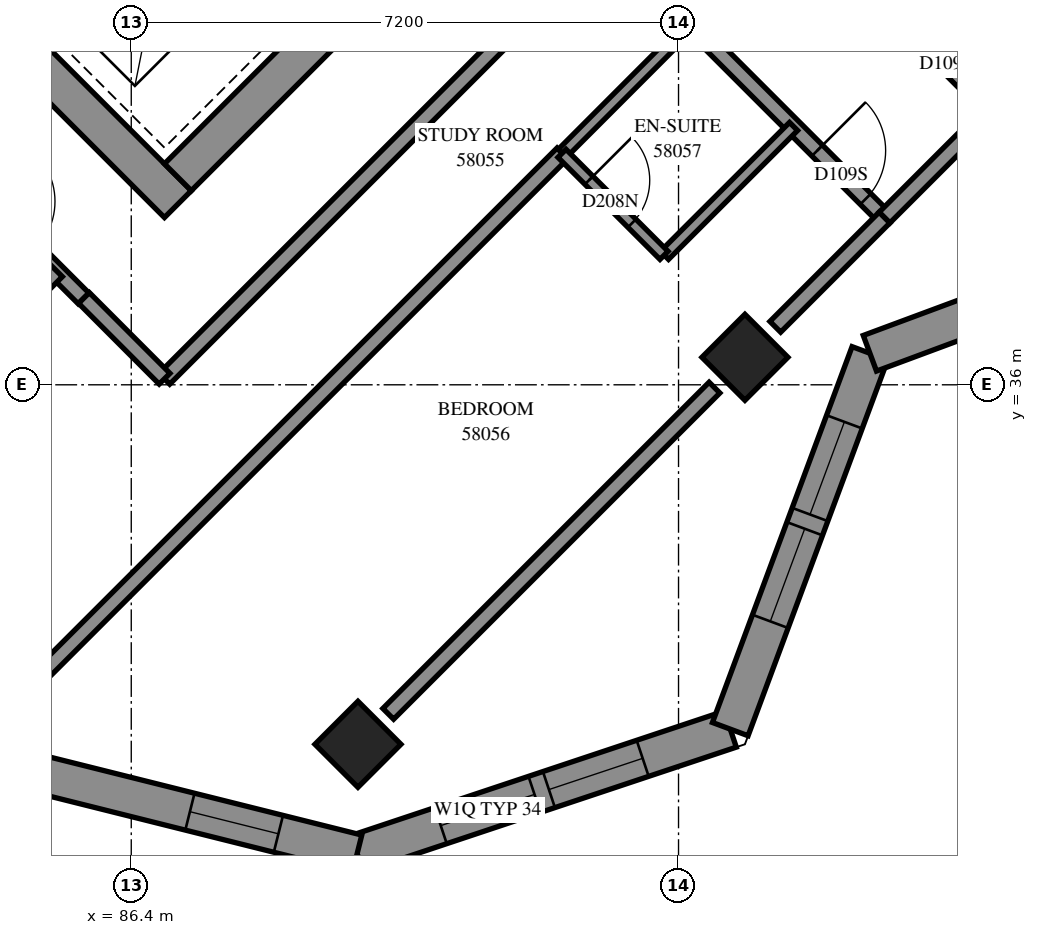
"""IFC4 building model, lengths in metres.
Left out: names, types, materials, properties, quantities, classifications, styles, units other than length and angle.
Written with IfcOpenShell. Run it as: python <this file> out.ifc"""

import sys

from ifc_helpers import new_model, si_unit, direction, frame, frame_2d, origin, origin_2d, place, context, subcontext, project, spatial, polyline, rectangle, outline, extrude, element, fill, save


model = new_model("IFC4")
c1 = context("Model", 3, precision=1e-05, world=origin(), true_north=direction((0.0, 1.0)))
c2 = subcontext(c1, "Body", "Model", "MODEL_VIEW")
j1 = project(units=[si_unit("LENGTHUNIT", "METRE"), si_unit("PLANEANGLEUNIT", "RADIAN")], contexts=[c1])
p1 = place(None, origin())
s1 = spatial("IfcSite", under=j1, at=p1, CompositionType="ELEMENT")
p2 = place(p1, origin())
s2 = spatial("IfcBuilding", under=s1, at=p2, CompositionType="ELEMENT")
p3 = place(p2, frame((0.0, 0.0, 213.4)))
s3 = spatial("IfcBuildingStorey", under=s2, at=p3, CompositionType="ELEMENT", Elevation=213.4)
for number, where, z_axis, x_axis in (
    (1, (94.474, 36.362, 0.0), (0.0, 0.0, 1.0), (0.707, -0.707, 0.0)),
    (2, (89.382, 31.271, 0.0), (0.0, 0.0, 1.0), (0.707, -0.707, 0.0)),
):
    element("IfcColumn", number, at=place(p3, frame(where, z_axis=z_axis, x_axis=x_axis)), inside=s3, PredefinedType="COLUMN", context=c2, shape_type="SweptSolid", body=[
        extrude(rectangle(XDim=0.8, YDim=0.8, at=origin_2d()), origin(), (0.0, 0.0, 1.0), 3.1),
    ])
p4 = place(p3, frame((76.124, 49.267, -0.3), z_axis=(0.0, 0.0, 1.0), x_axis=(0.7071067812, -0.7071067812, 0.0)))
e3 = element("IfcWall", 3, at=p4, inside=s3, PredefinedType="SHEAR", context=c2, shape_type="SweptSolid", body=[
    extrude(rectangle(XDim=15.4, YDim=0.5, at=frame_2d((7.7, 0.0))), origin(), (0.0, 0.0, 1.0), 2.7),
])
p5 = place(p3, frame((87.013, 38.731, -0.3), z_axis=(0.0, 0.0, 1.0), x_axis=(0.7071067812, 0.7071067812, 0.0)))
e4 = element("IfcWall", 4, at=p5, inside=s3, PredefinedType="SHEAR", context=c2, shape_type="SweptSolid", body=[
    extrude(rectangle(XDim=14.4, YDim=0.5, at=frame_2d((7.2, 0.0))), origin(), (0.0, 0.0, 1.0), 2.7),
])
p6 = place(p5, frame((4.55, 0.0, 0.3)))
e5 = element("IfcOpeningElement", 5, at=p6, cuts=e4, PredefinedType="OPENING", context=c2, shape_type="SweptSolid", body=[
    extrude(rectangle(XDim=1.1, YDim=2.1, at=frame_2d((0.55, 1.05))), frame((0.0, 0.26, 0.0), z_axis=(0.0, -1.0, 0.0), x_axis=(1.0, 0.0, 0.0)), (0.0, 0.0, 1.0), 0.52),
])
p7 = place(p5, frame((11.35, 0.0, 0.3)))
e6 = element("IfcOpeningElement", 6, at=p7, cuts=e4, PredefinedType="OPENING", context=c2, shape_type="SweptSolid", body=[
    extrude(rectangle(XDim=1.1, YDim=2.1, at=frame_2d((0.55, 1.05))), frame((0.0, 0.26, 0.0), z_axis=(0.0, -1.0, 0.0), x_axis=(1.0, 0.0, 0.0)), (0.0, 0.0, 1.0), 0.52),
])
p8 = place(p3, frame((89.372, 29.834, 0.0), z_axis=(0.0, 0.0, 1.0), x_axis=(0.9486871635, 0.3162161695, 0.0)))
e7 = element("IfcWall", 7, at=p8, inside=s3, PredefinedType="SOLIDWALL", context=c2, shape_type="SweptSolid", body=[
    extrude(outline(polyline([(-0.073, -0.25), (5.294, -0.25), (5.054, 0.25), (0.073, 0.25), (-0.073, -0.25)])), origin(), (0.0, 0.0, 1.0), 3.1),
])
p9 = place(p8, frame((1.159, 0.0, 0.45)))
e8 = element("IfcOpeningElement", 8, at=p9, cuts=e7, PredefinedType="OPENING", context=c2, shape_type="SweptSolid", body=[
    extrude(rectangle(XDim=1.3, YDim=2.5, at=frame_2d((0.65, 1.25))), frame((0.0, 0.26, 0.0), z_axis=(0.0, -1.0, 0.0), x_axis=(1.0, 0.0, 0.0)), (0.0, 0.0, 1.0), 0.52),
])
p10 = place(p8, frame((2.659, 0.0, 0.45)))
e9 = element("IfcOpeningElement", 9, at=p10, cuts=e7, PredefinedType="OPENING", context=c2, shape_type="SweptSolid", body=[
    extrude(rectangle(XDim=1.3, YDim=2.5, at=frame_2d((0.65, 1.25))), frame((0.0, 0.26, 0.0), z_axis=(0.0, -1.0, 0.0), x_axis=(1.0, 0.0, 0.0)), (0.0, 0.0, 1.0), 0.52),
])
p11 = place(p3, frame((94.281, 31.47, 0.0), z_axis=(0.0, 0.0, 1.0), x_axis=(0.3481903374, 0.9374238577, 0.0)))
e10 = element("IfcWall", 10, at=p11, inside=s3, PredefinedType="SOLIDWALL", context=c2, shape_type="SweptSolid", body=[
    extrude(outline(polyline([(-0.12, -0.25), (5.16, -0.25), (5.39, 0.25), (0.12, 0.25), (-0.12, -0.25)])), origin(), (0.0, 0.0, 1.0), 3.1),
])
p12 = place(p11, frame((1.512, 0.0, 0.45)))
e11 = element("IfcOpeningElement", 11, at=p12, cuts=e10, PredefinedType="OPENING", context=c2, shape_type="SweptSolid", body=[
    extrude(rectangle(XDim=1.3, YDim=2.5, at=frame_2d((0.65, 1.25))), frame((0.0, 0.26, 0.0), z_axis=(0.0, -1.0, 0.0), x_axis=(1.0, 0.0, 0.0)), (0.0, 0.0, 1.0), 0.52),
])
p13 = place(p11, frame((3.012, 0.0, 0.45)))
e12 = element("IfcOpeningElement", 12, at=p13, cuts=e10, PredefinedType="OPENING", context=c2, shape_type="SweptSolid", body=[
    extrude(rectangle(XDim=1.3, YDim=2.5, at=frame_2d((0.65, 1.25))), frame((0.0, 0.26, 0.0), z_axis=(0.0, -1.0, 0.0), x_axis=(1.0, 0.0, 0.0)), (0.0, 0.0, 1.0), 0.52),
])
p14 = place(p3, frame((96.118, 36.415, 0.0), z_axis=(0.0, 0.0, 1.0), x_axis=(0.9374238577, 0.3481903374, 0.0)))
e13 = element("IfcWall", 13, at=p14, inside=s3, PredefinedType="SOLIDWALL", context=c2, shape_type="SweptSolid", body=[
    extrude(outline(polyline([(0.115, -0.25), (5.395, -0.25), (5.155, 0.25), (-0.115, 0.25), (0.115, -0.25)])), origin(), (0.0, 0.0, 1.0), 3.1),
])
p15 = place(p14, frame((1.655, 0.0, 0.45)))
e14 = element("IfcOpeningElement", 14, at=p15, cuts=e13, PredefinedType="OPENING", context=c2, shape_type="SweptSolid", body=[
    extrude(rectangle(XDim=1.3, YDim=2.5, at=frame_2d((0.65, 1.25))), frame((0.0, 0.26, 0.0), z_axis=(0.0, -1.0, 0.0), x_axis=(1.0, 0.0, 0.0)), (0.0, 0.0, 1.0), 0.52),
])
p16 = place(p14, frame((3.155, 0.0, 0.45)))
e15 = element("IfcOpeningElement", 15, at=p16, cuts=e13, PredefinedType="OPENING", context=c2, shape_type="SweptSolid", body=[
    extrude(rectangle(XDim=1.3, YDim=2.5, at=frame_2d((0.65, 1.25))), frame((0.0, 0.26, 0.0), z_axis=(0.0, -1.0, 0.0), x_axis=(1.0, 0.0, 0.0)), (0.0, 0.0, 1.0), 0.52),
])
p17 = place(p3, frame((85.057, 30.913, 0.0), z_axis=(0.0, 0.0, 1.0), x_axis=(0.9701372106, -0.2425567824, 0.0)))
e16 = element("IfcWall", 16, at=p17, inside=s3, PredefinedType="SOLIDWALL", context=c2, shape_type="SweptSolid", body=[
    extrude(outline(polyline([(-0.144, -0.25), (4.521, -0.25), (4.376, 0.25), (0.144, 0.25), (-0.144, -0.25)])), origin(), (0.0, 0.0, 1.0), 3.1),
])
p18 = place(p17, frame((2.18, 0.0, 0.45)))
e17 = element("IfcOpeningElement", 17, at=p18, cuts=e16, PredefinedType="OPENING", context=c2, shape_type="SweptSolid", body=[
    extrude(rectangle(XDim=1.2, YDim=2.5, at=frame_2d((0.6, 1.25))), frame((0.0, 0.26, 0.0), z_axis=(0.0, -1.0, 0.0), x_axis=(1.0, 0.0, 0.0)), (0.0, 0.0, 1.0), 0.52),
])
p19 = place(p3, frame((85.007, 31.981, 0.0), z_axis=(0.0, 0.0, 1.0), x_axis=(0.7072318784, 0.7069816619, 0.0)))
e18 = element("IfcWall", 18, at=p19, inside=s3, PredefinedType="PARTITIONING", context=c2, shape_type="SweptSolid", body=[
    extrude(rectangle(XDim=9.991, YDim=0.2, at=frame_2d((4.996, 0.0))), origin(), (0.0, 0.0, 1.0), 3.1),
])
p20 = place(p3, frame((86.835, 36.079, 0.0), z_axis=(0.0, 0.0, 1.0), x_axis=(0.7071067812, 0.7071067812, 0.0)))
e19 = element("IfcWall", 19, at=p20, inside=s3, PredefinedType="PARTITIONING", context=c2, shape_type="SweptSolid", body=[
    extrude(rectangle(XDim=8.2, YDim=0.2, at=frame_2d((4.1, 0.0))), origin(), (0.0, 0.0, 1.0), 3.1),
])
p21 = place(p3, frame((80.849, 42.061, 0.0), z_axis=(0.0, 0.0, 1.0), x_axis=(0.7071067812, -0.7071067812, 0.0)))
e20 = element("IfcWall", 20, at=p21, inside=s3, PredefinedType="PARTITIONING", context=c2, shape_type="SweptSolid", body=[
    extrude(rectangle(XDim=6.964, YDim=0.2, at=frame_2d((3.482, 0.0))), origin(), (0.0, 0.0, 1.0), 3.1),
])
p22 = place(p21, frame((5.159, 0.0, 0.0)))
e21 = element("IfcOpeningElement", 21, at=p22, cuts=e20, PredefinedType="OPENING", context=c2, shape_type="SweptSolid", body=[
    extrude(rectangle(XDim=0.9, YDim=2.1, at=frame_2d((0.45, 1.05))), frame((0.0, 0.11, 0.0), z_axis=(0.0, -1.0, 0.0), x_axis=(1.0, 0.0, 0.0)), (0.0, 0.0, 1.0), 0.22),
])
p23 = place(p3, frame((89.781, 31.671, 0.0), z_axis=(0.0, 0.0, 1.0), x_axis=(0.7071067812, 0.7071067812, 0.0)))
e22 = element("IfcWall", 22, at=p23, inside=s3, PredefinedType="PARTITIONING", context=c2, shape_type="SweptSolid", body=[
    extrude(rectangle(XDim=6.07, YDim=0.2, at=frame_2d((3.035, 0.0))), origin(), (0.0, 0.0, 1.0), 2.6),
])
p24 = place(p3, frame((94.047, 43.287, 0.0), z_axis=(0.0, 0.0, 1.0), x_axis=(0.7071067812, -0.7071067812, 0.0)))
e23 = element("IfcWall", 23, at=p24, inside=s3, PredefinedType="PARTITIONING", context=c2, shape_type="SweptSolid", body=[
    extrude(rectangle(XDim=5.199, YDim=0.2, at=frame_2d((2.599, 0.0))), origin(), (0.0, 0.0, 1.0), 3.1),
])
p25 = place(p24, frame((3.898, 0.0, 0.0)))
e24 = element("IfcOpeningElement", 24, at=p25, cuts=e23, PredefinedType="OPENING", context=c2, shape_type="SweptSolid", body=[
    extrude(rectangle(XDim=0.9, YDim=2.1, at=frame_2d((0.45, 1.05))), frame((0.0, 0.11, 0.0), z_axis=(0.0, -1.0, 0.0), x_axis=(1.0, 0.0, 0.0)), (0.0, 0.0, 1.0), 0.22),
])
p26 = place(p3, frame((92.633, 41.873, 0.0), z_axis=(0.0, 0.0, 1.0), x_axis=(0.7071067812, -0.7071067812, 0.0)))
e25 = element("IfcWall", 25, at=p26, inside=s3, PredefinedType="PARTITIONING", context=c2, shape_type="SweptSolid", body=[
    extrude(rectangle(XDim=5.199, YDim=0.2, at=frame_2d((2.599, 0.0))), origin(), (0.0, 0.0, 1.0), 3.1),
])
p27 = place(p26, frame((0.253, 0.0, 0.0)))
e26 = element("IfcOpeningElement", 26, at=p27, cuts=e25, PredefinedType="OPENING", context=c2, shape_type="SweptSolid", body=[
    extrude(rectangle(XDim=1.0, YDim=2.1, at=frame_2d((0.5, 1.05))), frame((0.0, 0.11, 0.0), z_axis=(0.0, -1.0, 0.0), x_axis=(1.0, 0.0, 0.0)), (0.0, 0.0, 1.0), 0.22),
])
p28 = place(p26, frame((3.948, 0.0, 0.0)))
e27 = element("IfcOpeningElement", 27, at=p28, cuts=e25, PredefinedType="OPENING", context=c2, shape_type="SweptSolid", body=[
    extrude(rectangle(XDim=0.9, YDim=2.1, at=frame_2d((0.45, 1.05))), frame((0.0, 0.11, 0.0), z_axis=(0.0, -1.0, 0.0), x_axis=(1.0, 0.0, 0.0)), (0.0, 0.0, 1.0), 0.22),
])
for number, where, z_axis, x_axis in (
    (28, (92.072, 39.046, 0.0), (0.0, 0.0, 1.0), (0.707, 0.708, 0.0)),
    (29, (93.415, 37.703, 0.0), (0.0, 0.0, 1.0), (0.708, 0.707, 0.0)),
):
    element("IfcWall", number, at=place(p3, frame(where, z_axis=z_axis, x_axis=x_axis)), inside=s3, PredefinedType="PARTITIONING", context=c2, shape_type="SweptSolid", body=[
        extrude(rectangle(XDim=2.4, YDim=0.15, at=frame_2d((1.2, 0.0))), origin(), (0.0, 0.0, 1.0), 3.1),
    ])
p29 = place(p3, frame((94.873, 36.763, 0.0), z_axis=(0.0, 0.0, 1.0), x_axis=(0.7071067812, 0.7071067812, 0.0)))
e30 = element("IfcWall", 30, at=p29, inside=s3, PredefinedType="PARTITIONING", context=c2, shape_type="SweptSolid", body=[
    extrude(rectangle(XDim=2.034, YDim=0.2, at=frame_2d((1.017, 0.0))), origin(), (0.0, 0.0, 1.0), 2.6),
])
p30 = place(p3, frame((96.311, 38.201, 0.0), z_axis=(0.0, 0.0, 1.0), x_axis=(0.7071067812, 0.7071067812, 0.0)))
e31 = element("IfcWall", 31, at=p30, inside=s3, PredefinedType="PARTITIONING", context=c2, shape_type="SweptSolid", body=[
    extrude(rectangle(XDim=2.0, YDim=0.2, at=frame_2d((1.0, 0.0))), origin(), (0.0, 0.0, 1.0), 2.6),
])
p31 = place(p3, frame((92.067, 39.045, 0.0), z_axis=(0.0, 0.0, 1.0), x_axis=(0.7071067812, -0.7071067812, 0.0)))
e32 = element("IfcWall", 32, at=p31, inside=s3, PredefinedType="PARTITIONING", context=c2, shape_type="SweptSolid", body=[
    extrude(rectangle(XDim=1.898, YDim=0.15, at=frame_2d((0.949, 0.0))), origin(), (0.0, 0.0, 1.0), 3.1),
])
p32 = place(p31, frame((0.501, 0.0, 0.0)))
e33 = element("IfcOpeningElement", 33, at=p32, cuts=e32, PredefinedType="OPENING", context=c2, shape_type="SweptSolid", body=[
    extrude(rectangle(XDim=0.8, YDim=2.1, at=frame_2d((0.4, 1.05))), frame((0.0, 0.085, 0.0), z_axis=(0.0, -1.0, 0.0), x_axis=(1.0, 0.0, 0.0)), (0.0, 0.0, 1.0), 0.17),
])
p33 = place(p3, frame((85.778, 37.142, 0.0), z_axis=(0.0, 0.0, 1.0), x_axis=(0.7064400143, -0.70777292, 0.0)))
e34 = element("IfcWall", 34, at=p33, inside=s3, PredefinedType="PARTITIONING", context=c2, shape_type="SweptSolid", body=[
    extrude(rectangle(XDim=1.5, YDim=0.2, at=frame_2d((0.75, 0.0))), origin(), (0.0, 0.0, 1.0), 3.1),
])
p34 = place(p3, frame((84.693, 36.761, 0.0), z_axis=(0.0, 0.0, 1.0), x_axis=(0.7061388061, 0.708073433, 0.0)))
e35 = element("IfcWall", 35, at=p34, inside=s3, PredefinedType="PARTITIONING", context=c2, shape_type="SweptSolid", body=[
    extrude(rectangle(XDim=1.034, YDim=0.2, at=frame_2d((0.517, 0.0))), origin(), (0.0, 0.0, 1.0), 3.1),
])
p35 = place(p9, origin())
e36 = element("IfcWindow", 36, at=p35, inside=s3, PartitioningType="SINGLE_PANEL", PredefinedType="WINDOW", context=c2, shape_type="SweptSolid", body=[
    extrude(rectangle(XDim=1.3, YDim=2.5, at=frame_2d((0.65, 1.25))), frame((0.0, 0.18, 0.0), z_axis=(0.0, -1.0, 0.0), x_axis=(1.0, 0.0, 0.0)), (0.0, 0.0, 1.0), 0.06),
])
fill(e8, e36)
p36 = place(p10, origin())
e37 = element("IfcWindow", 37, at=p36, inside=s3, PartitioningType="SINGLE_PANEL", PredefinedType="WINDOW", context=c2, shape_type="SweptSolid", body=[
    extrude(rectangle(XDim=1.3, YDim=2.5, at=frame_2d((0.65, 1.25))), frame((0.0, 0.18, 0.0), z_axis=(0.0, -1.0, 0.0), x_axis=(1.0, 0.0, 0.0)), (0.0, 0.0, 1.0), 0.06),
])
fill(e9, e37)
p37 = place(p12, origin())
e38 = element("IfcWindow", 38, at=p37, inside=s3, PartitioningType="SINGLE_PANEL", PredefinedType="WINDOW", context=c2, shape_type="SweptSolid", body=[
    extrude(rectangle(XDim=1.3, YDim=2.5, at=frame_2d((0.65, 1.25))), frame((0.0, 0.18, 0.0), z_axis=(0.0, -1.0, 0.0), x_axis=(1.0, 0.0, 0.0)), (0.0, 0.0, 1.0), 0.06),
])
fill(e11, e38)
p38 = place(p13, origin())
e39 = element("IfcWindow", 39, at=p38, inside=s3, PartitioningType="SINGLE_PANEL", PredefinedType="WINDOW", context=c2, shape_type="SweptSolid", body=[
    extrude(rectangle(XDim=1.3, YDim=2.5, at=frame_2d((0.65, 1.25))), frame((0.0, 0.18, 0.0), z_axis=(0.0, -1.0, 0.0), x_axis=(1.0, 0.0, 0.0)), (0.0, 0.0, 1.0), 0.06),
])
fill(e12, e39)
p39 = place(p18, origin())
e40 = element("IfcWindow", 40, at=p39, inside=s3, PartitioningType="SINGLE_PANEL", PredefinedType="WINDOW", context=c2, shape_type="SweptSolid", body=[
    extrude(rectangle(XDim=1.2, YDim=2.5, at=frame_2d((0.6, 1.25))), frame((0.0, 0.18, 0.0), z_axis=(0.0, -1.0, 0.0), x_axis=(1.0, 0.0, 0.0)), (0.0, 0.0, 1.0), 0.06),
])
fill(e17, e40)
p40 = place(p28, origin())
e41 = element("IfcDoor", 41, at=p40, inside=s3, OperationType="SINGLE_SWING_LEFT", PredefinedType="DOOR", context=c2, shape_type="SweptSolid", body=[
    extrude(rectangle(XDim=0.9, YDim=2.1, at=frame_2d((0.45, 1.05))), frame((0.0, 0.025, 0.0), z_axis=(0.0, -1.0, 0.0), x_axis=(1.0, 0.0, 0.0)), (0.0, 0.0, 1.0), 0.05),
])
fill(e27, e41)
p41 = place(p32, origin())
e42 = element("IfcDoor", 42, at=p41, inside=s3, OperationType="SINGLE_SWING_RIGHT", PredefinedType="DOOR", context=c2, shape_type="SweptSolid", body=[
    extrude(rectangle(XDim=0.8, YDim=2.1, at=frame_2d((0.4, 1.05))), frame((0.0, 0.025, 0.0), z_axis=(0.0, -1.0, 0.0), x_axis=(1.0, 0.0, 0.0)), (0.0, 0.0, 1.0), 0.05),
])
fill(e33, e42)
p42 = place(p25, origin())
e43 = element("IfcDoor", 43, at=p42, inside=s3, OperationType="SINGLE_SWING_RIGHT", PredefinedType="DOOR", context=c2, shape_type="SweptSolid", body=[
    extrude(rectangle(XDim=0.9, YDim=2.1, at=frame_2d((0.45, 1.05))), frame((0.0, 0.025, 0.0), z_axis=(0.0, -1.0, 0.0), x_axis=(1.0, 0.0, 0.0)), (0.0, 0.0, 1.0), 0.05),
])
fill(e24, e43)
save(model, sys.argv[1])
